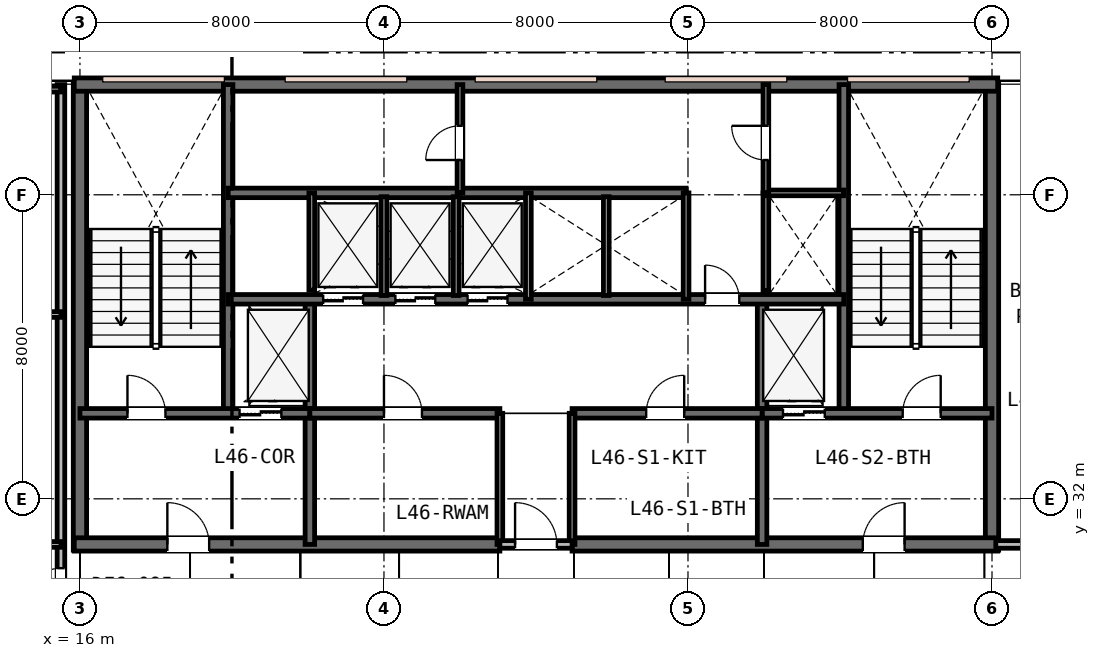
"""IFC4 building model, lengths in metres.
Left out: names, types, materials, properties, quantities, classifications, styles, units other than length and angle.
Written with IfcOpenShell. Run it as: python <this file> out.ifc"""

import sys

from ifc_helpers import new_model, si_unit, direction, frame, frame_2d, origin, place, context, subcontext, project, spatial, rectangle, extrude, element, fill, save


model = new_model("IFC4")
c1 = context("Model", 3, precision=1e-05, world=origin(), true_north=direction((0.0, 1.0)))
c2 = subcontext(c1, "Body", "Model", "MODEL_VIEW")
j1 = project(units=[si_unit("LENGTHUNIT", "METRE"), si_unit("PLANEANGLEUNIT", "RADIAN")], contexts=[c1])
p1 = place(None, origin())
s1 = spatial("IfcSite", under=j1, at=p1, CompositionType="ELEMENT")
p2 = place(p1, origin())
s2 = spatial("IfcBuilding", under=s1, at=p2, CompositionType="ELEMENT")
p3 = place(p2, frame((0.0, 0.0, 179.4)))
s3 = spatial("IfcBuildingStorey", under=s2, at=p3, CompositionType="ELEMENT", Elevation=179.4)
for number, where, z_axis, x_axis in (
    (1, (16.0, 30.65, 0.0), (0.0, 0.0, 1.0), (0.0, 1.0, 0.0)),
    (2, (40.0, 30.65, 0.0), (0.0, 0.0, 1.0), (0.0, 1.0, 0.0)),
):
    element("IfcWall", number, at=place(p3, frame(where, z_axis=z_axis, x_axis=x_axis)), inside=s3, PredefinedType="SHEAR", context=c2, shape_type="SweptSolid", body=[
        extrude(rectangle(XDim=12.3, YDim=0.35, at=frame_2d((6.15, 0.0))), origin(), (0.0, 0.0, 1.0), 3.6),
    ])
p4 = place(p3, frame((15.85, 42.9, 0.0), z_axis=(0.0, 0.0, 1.0), x_axis=(1.0, 0.0, 0.0)))
e3 = element("IfcWall", 3, at=p4, inside=s3, PredefinedType="SHEAR", context=c2, shape_type="SweptSolid", body=[
    extrude(rectangle(XDim=24.3, YDim=0.35, at=frame_2d((12.15, 0.0))), origin(), (0.0, 0.0, 1.0), 3.6),
])
p5 = place(p3, frame((15.85, 30.8, 0.0), z_axis=(0.0, 0.0, 1.0), x_axis=(1.0, 0.0, 0.0)))
e4 = element("IfcWall", 4, at=p5, inside=s3, PredefinedType="SHEAR", context=c2, shape_type="SweptSolid", body=[
    extrude(rectangle(XDim=11.2, YDim=0.35, at=frame_2d((5.6, 0.0))), origin(), (0.0, 0.0, 1.0), 3.6),
])
p6 = place(p5, frame((2.45, 0.0, 0.0)))
e5 = element("IfcOpeningElement", 5, at=p6, cuts=e4, PredefinedType="OPENING", context=c2, shape_type="SweptSolid", body=[
    extrude(rectangle(XDim=1.1, YDim=2.15, at=frame_2d((0.55, 1.075))), frame((0.0, 0.185, 0.0), z_axis=(0.0, -1.0, 0.0), x_axis=(1.0, 0.0, 0.0)), (0.0, 0.0, 1.0), 0.37),
])
p7 = place(p3, frame((28.95, 30.8, 0.0), z_axis=(0.0, 0.0, 1.0), x_axis=(1.0, 0.0, 0.0)))
e6 = element("IfcWall", 6, at=p7, inside=s3, PredefinedType="SHEAR", context=c2, shape_type="SweptSolid", body=[
    extrude(rectangle(XDim=11.2, YDim=0.35, at=frame_2d((5.6, 0.0))), origin(), (0.0, 0.0, 1.0), 3.6),
])
p8 = place(p7, frame((7.65, 0.0, 0.0)))
e7 = element("IfcOpeningElement", 7, at=p8, cuts=e6, PredefinedType="OPENING", context=c2, shape_type="SweptSolid", body=[
    extrude(rectangle(XDim=1.1, YDim=2.15, at=frame_2d((0.55, 1.075))), frame((0.0, 0.185, 0.0), z_axis=(0.0, -1.0, 0.0), x_axis=(1.0, 0.0, 0.0)), (0.0, 0.0, 1.0), 0.37),
])
for number, where, z_axis, x_axis in (
    (8, (19.9, 34.25, 0.0), (0.0, 0.0, 1.0), (0.0, 1.0, 0.0)),
    (9, (36.1, 34.25, 0.0), (0.0, 0.0, 1.0), (0.0, 1.0, 0.0)),
):
    element("IfcWall", number, at=place(p3, frame(where, z_axis=z_axis, x_axis=x_axis)), inside=s3, PredefinedType="SHEAR", context=c2, shape_type="SweptSolid", body=[
        extrude(rectangle(XDim=8.65, YDim=0.25, at=frame_2d((4.325, 0.0))), origin(), (0.0, 0.0, 1.0), 3.6),
    ])
for number, where, z_axis, x_axis in (
    (10, (22.05, 30.8, 0.0), (0.0, 0.0, 1.0), (0.0, 1.0, 0.0)),
    (11, (33.95, 30.8, 0.0), (0.0, 0.0, 1.0), (0.0, 1.0, 0.0)),
):
    element("IfcWall", number, at=place(p3, frame(where, z_axis=z_axis, x_axis=x_axis)), inside=s3, PredefinedType="SHEAR", context=c2, shape_type="SweptSolid", body=[
        extrude(rectangle(XDim=6.45, YDim=0.25, at=frame_2d((3.225, 0.0))), origin(), (0.0, 0.0, 1.0), 3.6),
    ])
p9 = place(p3, frame((16.0, 34.25, 0.0), z_axis=(0.0, 0.0, 1.0), x_axis=(1.0, 0.0, 0.0)))
e12 = element("IfcWall", 12, at=p9, inside=s3, PredefinedType="SHEAR", context=c2, shape_type="SweptSolid", body=[
    extrude(rectangle(XDim=6.05, YDim=0.25, at=frame_2d((3.025, 0.0))), origin(), (0.0, 0.0, 1.0), 3.6),
])
p10 = place(p9, frame((1.25, 0.0, 0.0)))
e13 = element("IfcOpeningElement", 13, at=p10, cuts=e12, PredefinedType="OPENING", context=c2, shape_type="SweptSolid", body=[
    extrude(rectangle(XDim=1.0, YDim=2.15, at=frame_2d((0.5, 1.075))), frame((0.0, 0.135, 0.0), z_axis=(0.0, -1.0, 0.0), x_axis=(1.0, 0.0, 0.0)), (0.0, 0.0, 1.0), 0.27),
])
p11 = place(p9, frame((4.2, 0.0, 0.0)))
e14 = element("IfcOpeningElement", 14, at=p11, cuts=e12, PredefinedType="OPENING", context=c2, shape_type="SweptSolid", body=[
    extrude(rectangle(XDim=1.1, YDim=2.15, at=frame_2d((0.55, 1.075))), frame((0.0, 0.135, 0.0), z_axis=(0.0, -1.0, 0.0), x_axis=(1.0, 0.0, 0.0)), (0.0, 0.0, 1.0), 0.27),
])
p12 = place(p3, frame((33.95, 34.25, 0.0), z_axis=(0.0, 0.0, 1.0), x_axis=(1.0, 0.0, 0.0)))
e15 = element("IfcWall", 15, at=p12, inside=s3, PredefinedType="SHEAR", context=c2, shape_type="SweptSolid", body=[
    extrude(rectangle(XDim=6.05, YDim=0.25, at=frame_2d((3.025, 0.0))), origin(), (0.0, 0.0, 1.0), 3.6),
])
p13 = place(p12, frame((3.7, 0.0, 0.0)))
e16 = element("IfcOpeningElement", 16, at=p13, cuts=e15, PredefinedType="OPENING", context=c2, shape_type="SweptSolid", body=[
    extrude(rectangle(XDim=1.0, YDim=2.15, at=frame_2d((0.5, 1.075))), frame((0.0, 0.135, 0.0), z_axis=(0.0, -1.0, 0.0), x_axis=(1.0, 0.0, 0.0)), (0.0, 0.0, 1.0), 0.27),
])
p14 = place(p12, frame((0.55, 0.0, 0.0)))
e17 = element("IfcOpeningElement", 17, at=p14, cuts=e15, PredefinedType="OPENING", context=c2, shape_type="SweptSolid", body=[
    extrude(rectangle(XDim=1.1, YDim=2.15, at=frame_2d((0.55, 1.075))), frame((0.0, 0.135, 0.0), z_axis=(0.0, -1.0, 0.0), x_axis=(1.0, 0.0, 0.0)), (0.0, 0.0, 1.0), 0.27),
])
p15 = place(p3, frame((22.05, 34.25, 0.0), z_axis=(0.0, 0.0, 1.0), x_axis=(1.0, 0.0, 0.0)))
e18 = element("IfcWall", 18, at=p15, inside=s3, PredefinedType="SHEAR", context=c2, shape_type="SweptSolid", body=[
    extrude(rectangle(XDim=5.0, YDim=0.25, at=frame_2d((2.5, 0.0))), origin(), (0.0, 0.0, 1.0), 3.6),
])
p16 = place(p15, frame((1.95, 0.0, 0.0)))
e19 = element("IfcOpeningElement", 19, at=p16, cuts=e18, PredefinedType="OPENING", context=c2, shape_type="SweptSolid", body=[
    extrude(rectangle(XDim=1.0, YDim=2.15, at=frame_2d((0.5, 1.075))), frame((0.0, 0.135, 0.0), z_axis=(0.0, -1.0, 0.0), x_axis=(1.0, 0.0, 0.0)), (0.0, 0.0, 1.0), 0.27),
])
p17 = place(p3, frame((28.95, 34.25, 0.0), z_axis=(0.0, 0.0, 1.0), x_axis=(1.0, 0.0, 0.0)))
e20 = element("IfcWall", 20, at=p17, inside=s3, PredefinedType="SHEAR", context=c2, shape_type="SweptSolid", body=[
    extrude(rectangle(XDim=5.0, YDim=0.25, at=frame_2d((2.5, 0.0))), origin(), (0.0, 0.0, 1.0), 3.6),
])
p18 = place(p17, frame((1.95, 0.0, 0.0)))
e21 = element("IfcOpeningElement", 21, at=p18, cuts=e20, PredefinedType="OPENING", context=c2, shape_type="SweptSolid", body=[
    extrude(rectangle(XDim=1.0, YDim=2.15, at=frame_2d((0.5, 1.075))), frame((0.0, 0.135, 0.0), z_axis=(0.0, -1.0, 0.0), x_axis=(1.0, 0.0, 0.0)), (0.0, 0.0, 1.0), 0.27),
])
p19 = place(p3, frame((19.9, 37.25, 0.0), z_axis=(0.0, 0.0, 1.0), x_axis=(1.0, 0.0, 0.0)))
e22 = element("IfcWall", 22, at=p19, inside=s3, PredefinedType="SHEAR", context=c2, shape_type="SweptSolid", body=[
    extrude(rectangle(XDim=16.2, YDim=0.25, at=frame_2d((8.1, 0.0))), origin(), (0.0, 0.0, 1.0), 3.6),
])
p20 = place(p19, frame((12.55, 0.0, 0.0)))
e23 = element("IfcOpeningElement", 23, at=p20, cuts=e22, PredefinedType="OPENING", context=c2, shape_type="SweptSolid", body=[
    extrude(rectangle(XDim=0.9, YDim=2.15, at=frame_2d((0.45, 1.075))), frame((0.0, 0.135, 0.0), z_axis=(0.0, -1.0, 0.0), x_axis=(1.0, 0.0, 0.0)), (0.0, 0.0, 1.0), 0.27),
])
p21 = place(p19, frame((2.5, 0.0, 0.0)))
e24 = element("IfcOpeningElement", 24, at=p21, cuts=e22, PredefinedType="OPENING", context=c2, shape_type="SweptSolid", body=[
    extrude(rectangle(XDim=1.05, YDim=2.15, at=frame_2d((0.525, 1.075))), frame((0.0, 0.135, 0.0), z_axis=(0.0, -1.0, 0.0), x_axis=(1.0, 0.0, 0.0)), (0.0, 0.0, 1.0), 0.27),
])
p22 = place(p19, frame((4.4, 0.0, 0.0)))
e25 = element("IfcOpeningElement", 25, at=p22, cuts=e22, PredefinedType="OPENING", context=c2, shape_type="SweptSolid", body=[
    extrude(rectangle(XDim=1.05, YDim=2.15, at=frame_2d((0.525, 1.075))), frame((0.0, 0.135, 0.0), z_axis=(0.0, -1.0, 0.0), x_axis=(1.0, 0.0, 0.0)), (0.0, 0.0, 1.0), 0.27),
])
p23 = place(p19, frame((6.3, 0.0, 0.0)))
e26 = element("IfcOpeningElement", 26, at=p23, cuts=e22, PredefinedType="OPENING", context=c2, shape_type="SweptSolid", body=[
    extrude(rectangle(XDim=1.05, YDim=2.15, at=frame_2d((0.525, 1.075))), frame((0.0, 0.135, 0.0), z_axis=(0.0, -1.0, 0.0), x_axis=(1.0, 0.0, 0.0)), (0.0, 0.0, 1.0), 0.27),
])
p24 = place(p3, frame((19.9, 40.05, 0.0), z_axis=(0.0, 0.0, 1.0), x_axis=(1.0, 0.0, 0.0)))
e27 = element("IfcWall", 27, at=p24, inside=s3, PredefinedType="SHEAR", context=c2, shape_type="SweptSolid", body=[
    extrude(rectangle(XDim=12.05, YDim=0.25, at=frame_2d((6.025, 0.0))), origin(), (0.0, 0.0, 1.0), 3.6),
])
for number, where, z_axis, x_axis in (
    (28, (27.05, 30.8, 0.0), (0.0, 0.0, 1.0), (0.0, 1.0, 0.0)),
    (29, (28.95, 30.8, 0.0), (0.0, 0.0, 1.0), (0.0, 1.0, 0.0)),
):
    element("IfcWall", number, at=place(p3, frame(where, z_axis=z_axis, x_axis=x_axis)), inside=s3, PredefinedType="PLUMBINGWALL", context=c2, shape_type="SweptSolid", body=[
        extrude(rectangle(XDim=3.45, YDim=0.15, at=frame_2d((1.725, 0.0))), origin(), (0.0, 0.0, 1.0), 3.07),
    ])
p25 = place(p3, frame((27.05, 30.8, 0.0), z_axis=(0.0, 0.0, 1.0), x_axis=(1.0, 0.0, 0.0)))
e30 = element("IfcWall", 30, at=p25, inside=s3, PredefinedType="PARTITIONING", context=c2, shape_type="SweptSolid", body=[
    extrude(rectangle(XDim=1.9, YDim=0.2, at=frame_2d((0.95, 0.0))), origin(), (0.0, 0.0, 1.0), 3.07),
])
p26 = place(p25, frame((0.4, 0.0, 0.0)))
e31 = element("IfcOpeningElement", 31, at=p26, cuts=e30, PredefinedType="OPENING", context=c2, shape_type="SweptSolid", body=[
    extrude(rectangle(XDim=1.1, YDim=2.15, at=frame_2d((0.55, 1.075))), frame((0.0, 0.11, 0.0), z_axis=(0.0, -1.0, 0.0), x_axis=(1.0, 0.0, 0.0)), (0.0, 0.0, 1.0), 0.22),
])
p27 = place(p3, frame((22.1, 37.49, 0.0), z_axis=(0.0, 0.0, 1.0), x_axis=(0.0, 1.0, 0.0)))
e32 = element("IfcWall", 32, at=p27, inside=s3, PredefinedType="PLUMBINGWALL", context=c2, shape_type="SweptSolid", body=[
    extrude(rectangle(XDim=2.56, YDim=0.15, at=frame_2d((1.28, 0.0))), origin(), (0.0, 0.0, 1.0), 3.33),
])
p28 = place(p3, frame((27.8, 37.25, 0.0), z_axis=(0.0, 0.0, 1.0), x_axis=(0.0, 1.0, 0.0)))
e33 = element("IfcWall", 33, at=p28, inside=s3, PredefinedType="PLUMBINGWALL", context=c2, shape_type="SweptSolid", body=[
    extrude(rectangle(XDim=2.8, YDim=0.15, at=frame_2d((1.4, 0.0))), origin(), (0.0, 0.0, 1.0), 3.33),
])
for number, where, z_axis, x_axis in (
    (34, (24.0, 37.35, 0.0), (0.0, 0.0, 1.0), (0.0, 1.0, 0.0)),
    (35, (25.9, 37.35, 0.0), (0.0, 0.0, 1.0), (0.0, 1.0, 0.0)),
):
    element("IfcWall", number, at=place(p3, frame(where, z_axis=z_axis, x_axis=x_axis)), inside=s3, PredefinedType="PLUMBINGWALL", context=c2, shape_type="SweptSolid", body=[
        extrude(rectangle(XDim=2.6, YDim=0.15, at=frame_2d((1.3, 0.0))), origin(), (0.0, 0.0, 1.0), 3.33),
    ])
p29 = place(p3, frame((31.95, 37.25, 0.0), z_axis=(0.0, 0.0, 1.0), x_axis=(0.0, 1.0, 0.0)))
e36 = element("IfcWall", 36, at=p29, inside=s3, PredefinedType="PLUMBINGWALL", context=c2, shape_type="SweptSolid", body=[
    extrude(rectangle(XDim=2.8, YDim=0.15, at=frame_2d((1.4, 0.0))), origin(), (0.0, 0.0, 1.0), 3.33),
])
p30 = place(p3, frame((29.85, 37.35, 0.0), z_axis=(0.0, 0.0, 1.0), x_axis=(0.0, 1.0, 0.0)))
e37 = element("IfcWall", 37, at=p30, inside=s3, PredefinedType="PLUMBINGWALL", context=c2, shape_type="SweptSolid", body=[
    extrude(rectangle(XDim=2.6, YDim=0.15, at=frame_2d((1.3, 0.0))), origin(), (0.0, 0.0, 1.0), 3.33),
])
p31 = place(p3, frame((34.05, 37.473, 0.0), z_axis=(0.0, 0.0, 1.0), x_axis=(0.0, 1.0, 0.0)))
e38 = element("IfcWall", 38, at=p31, inside=s3, PredefinedType="PLUMBINGWALL", context=c2, shape_type="SweptSolid", body=[
    extrude(rectangle(XDim=2.577, YDim=0.15, at=frame_2d((1.288, 0.0))), origin(), (0.0, 0.0, 1.0), 3.33),
])
p32 = place(p3, frame((34.05, 40.05, 0.0), z_axis=(0.0, 0.0, 1.0), x_axis=(1.0, 0.0, 0.0)))
e39 = element("IfcWall", 39, at=p32, inside=s3, PredefinedType="PARTITIONING", context=c2, shape_type="SweptSolid", body=[
    extrude(rectangle(XDim=2.05, YDim=0.15, at=frame_2d((1.025, 0.0))), origin(), (0.0, 0.0, 1.0), 3.33),
])
p33 = place(p3, frame((34.05, 40.05, 0.0), z_axis=(0.0, 0.0, 1.0), x_axis=(0.0, 1.0, 0.0)))
e40 = element("IfcWall", 40, at=p33, inside=s3, PredefinedType="PARTITIONING", context=c2, shape_type="SweptSolid", body=[
    extrude(rectangle(XDim=2.85, YDim=0.15, at=frame_2d((1.425, 0.0))), origin(), (0.0, 0.0, 1.0), 3.33),
])
p34 = place(p33, frame((0.865, 0.0, 0.0)))
e41 = element("IfcOpeningElement", 41, at=p34, cuts=e40, PredefinedType="OPENING", context=c2, shape_type="SweptSolid", body=[
    extrude(rectangle(XDim=0.9, YDim=2.15, at=frame_2d((0.45, 1.075))), frame((0.0, 0.085, 0.0), z_axis=(0.0, -1.0, 0.0), x_axis=(1.0, 0.0, 0.0)), (0.0, 0.0, 1.0), 0.17),
])
p35 = place(p3, frame((26.0, 40.05, 0.0), z_axis=(0.0, 0.0, 1.0), x_axis=(0.0, 1.0, 0.0)))
e42 = element("IfcWall", 42, at=p35, inside=s3, PredefinedType="PARTITIONING", context=c2, shape_type="SweptSolid", body=[
    extrude(rectangle(XDim=2.85, YDim=0.15, at=frame_2d((1.425, 0.0))), origin(), (0.0, 0.0, 1.0), 3.33),
])
p36 = place(p35, frame((0.865, 0.0, 0.0)))
e43 = element("IfcOpeningElement", 43, at=p36, cuts=e42, PredefinedType="OPENING", context=c2, shape_type="SweptSolid", body=[
    extrude(rectangle(XDim=0.9, YDim=2.15, at=frame_2d((0.45, 1.075))), frame((0.0, 0.085, 0.0), z_axis=(0.0, -1.0, 0.0), x_axis=(1.0, 0.0, 0.0)), (0.0, 0.0, 1.0), 0.17),
])
p37 = place(p3, frame((15.5, 28.6, 0.0), z_axis=(0.0, 0.0, 1.0), x_axis=(0.0, 1.0, 0.0)))
e44 = element("IfcWall", 44, at=p37, inside=s3, PredefinedType="PARTITIONING", context=c2, shape_type="SweptSolid", body=[
    extrude(rectangle(XDim=14.3, YDim=0.2, at=frame_2d((7.15, 0.0))), origin(), (0.0, 0.0, 1.0), 2.92),
])
p38 = place(p37, frame((0.625, 0.0, 0.0)))
e45 = element("IfcOpeningElement", 45, at=p38, cuts=e44, PredefinedType="OPENING", context=c2, shape_type="SweptSolid", body=[
    extrude(rectangle(XDim=0.95, YDim=2.15, at=frame_2d((0.475, 1.075))), frame((0.0, 0.11, 0.0), z_axis=(0.0, -1.0, 0.0), x_axis=(1.0, 0.0, 0.0)), (0.0, 0.0, 1.0), 0.22),
])
p39 = place(p3, frame((12.9, 30.8, 0.0), z_axis=(0.0, 0.0, 1.0), x_axis=(1.0, 0.0, 0.0)))
e46 = element("IfcWall", 46, at=p39, inside=s3, PredefinedType="PARTITIONING", context=c2, shape_type="SweptSolid", body=[
    extrude(rectangle(XDim=2.6, YDim=0.15, at=frame_2d((1.3, 0.0))), origin(), (0.0, 0.0, 1.0), 2.92),
])
for number, where, z_axis, x_axis in (
    (47, (12.9, 36.85, 0.0), (0.0, 0.0, 1.0), (1.0, 0.0, 0.0)),
    (48, (12.9, 42.78, 0.0), (0.0, 0.0, 1.0), (1.0, 0.0, 0.0)),
):
    element("IfcWall", number, at=place(p3, frame(where, z_axis=z_axis, x_axis=x_axis)), inside=s3, PredefinedType="PARTITIONING", context=c2, shape_type="SweptSolid", body=[
        extrude(rectangle(XDim=2.6, YDim=0.15, at=frame_2d((1.3, 0.0))), origin(), (0.0, 0.0, 1.0), 3.33),
    ])
p40 = place(p3, frame((40.1, 30.8, 0.0), z_axis=(0.0, 0.0, 1.0), x_axis=(1.0, 0.0, 0.0)))
e49 = element("IfcWall", 49, at=p40, inside=s3, PredefinedType="PARTITIONING", context=c2, shape_type="SweptSolid", body=[
    extrude(rectangle(XDim=4.1, YDim=0.2, at=frame_2d((2.05, 0.0))), origin(), (0.0, 0.0, 1.0), 2.92),
])
p41 = place(p40, frame((1.575, 0.0, 0.0)))
e50 = element("IfcOpeningElement", 50, at=p41, cuts=e49, PredefinedType="OPENING", context=c2, shape_type="SweptSolid", body=[
    extrude(rectangle(XDim=0.95, YDim=2.15, at=frame_2d((0.475, 1.075))), frame((0.0, 0.11, 0.0), z_axis=(0.0, -1.0, 0.0), x_axis=(1.0, 0.0, 0.0)), (0.0, 0.0, 1.0), 0.22),
])
p42 = place(p26, origin())
e51 = element("IfcDoor", 51, at=p42, inside=s3, OperationType="SINGLE_SWING_LEFT", PredefinedType="DOOR", context=c2, shape_type="SweptSolid", body=[
    extrude(rectangle(XDim=1.1, YDim=2.15, at=frame_2d((0.55, 1.075))), frame((0.0, 0.025, 0.0), z_axis=(0.0, -1.0, 0.0), x_axis=(1.0, 0.0, 0.0)), (0.0, 0.0, 1.0), 0.05),
])
fill(e31, e51)
p43 = place(p10, origin())
e52 = element("IfcDoor", 52, at=p43, inside=s3, OperationType="SINGLE_SWING_LEFT", PredefinedType="DOOR", context=c2, shape_type="SweptSolid", body=[
    extrude(rectangle(XDim=1.0, YDim=2.15, at=frame_2d((0.5, 1.075))), frame((0.0, 0.025, 0.0), z_axis=(0.0, -1.0, 0.0), x_axis=(1.0, 0.0, 0.0)), (0.0, 0.0, 1.0), 0.05),
])
fill(e13, e52)
p44 = place(p13, origin())
e53 = element("IfcDoor", 53, at=p44, inside=s3, OperationType="SINGLE_SWING_RIGHT", PredefinedType="DOOR", context=c2, shape_type="SweptSolid", body=[
    extrude(rectangle(XDim=1.0, YDim=2.15, at=frame_2d((0.5, 1.075))), frame((0.0, 0.025, 0.0), z_axis=(0.0, -1.0, 0.0), x_axis=(1.0, 0.0, 0.0)), (0.0, 0.0, 1.0), 0.05),
])
fill(e16, e53)
p45 = place(p6, origin())
e54 = element("IfcDoor", 54, at=p45, inside=s3, OperationType="SINGLE_SWING_LEFT", PredefinedType="DOOR", context=c2, shape_type="SweptSolid", body=[
    extrude(rectangle(XDim=1.1, YDim=2.15, at=frame_2d((0.55, 1.075))), frame((0.0, 0.025, 0.0), z_axis=(0.0, -1.0, 0.0), x_axis=(1.0, 0.0, 0.0)), (0.0, 0.0, 1.0), 0.05),
])
fill(e5, e54)
p46 = place(p8, origin())
e55 = element("IfcDoor", 55, at=p46, inside=s3, OperationType="SINGLE_SWING_RIGHT", PredefinedType="DOOR", context=c2, shape_type="SweptSolid", body=[
    extrude(rectangle(XDim=1.1, YDim=2.15, at=frame_2d((0.55, 1.075))), frame((0.0, 0.025, 0.0), z_axis=(0.0, -1.0, 0.0), x_axis=(1.0, 0.0, 0.0)), (0.0, 0.0, 1.0), 0.05),
])
fill(e7, e55)
p47 = place(p16, origin())
e56 = element("IfcDoor", 56, at=p47, inside=s3, OperationType="SINGLE_SWING_LEFT", PredefinedType="DOOR", context=c2, shape_type="SweptSolid", body=[
    extrude(rectangle(XDim=1.0, YDim=2.15, at=frame_2d((0.5, 1.075))), frame((0.0, 0.025, 0.0), z_axis=(0.0, -1.0, 0.0), x_axis=(1.0, 0.0, 0.0)), (0.0, 0.0, 1.0), 0.05),
])
fill(e19, e56)
p48 = place(p18, origin())
e57 = element("IfcDoor", 57, at=p48, inside=s3, OperationType="SINGLE_SWING_RIGHT", PredefinedType="DOOR", context=c2, shape_type="SweptSolid", body=[
    extrude(rectangle(XDim=1.0, YDim=2.15, at=frame_2d((0.5, 1.075))), frame((0.0, 0.025, 0.0), z_axis=(0.0, -1.0, 0.0), x_axis=(1.0, 0.0, 0.0)), (0.0, 0.0, 1.0), 0.05),
])
fill(e21, e57)
p49 = place(p20, origin())
e58 = element("IfcDoor", 58, at=p49, inside=s3, OperationType="SINGLE_SWING_LEFT", PredefinedType="DOOR", context=c2, shape_type="SweptSolid", body=[
    extrude(rectangle(XDim=0.9, YDim=2.15, at=frame_2d((0.45, 1.075))), frame((0.0, 0.025, 0.0), z_axis=(0.0, -1.0, 0.0), x_axis=(1.0, 0.0, 0.0)), (0.0, 0.0, 1.0), 0.05),
])
fill(e23, e58)
p50 = place(p34, origin())
e59 = element("IfcDoor", 59, at=p50, inside=s3, OperationType="SINGLE_SWING_RIGHT", PredefinedType="DOOR", context=c2, shape_type="SweptSolid", body=[
    extrude(rectangle(XDim=0.9, YDim=2.15, at=frame_2d((0.45, 1.075))), frame((0.0, 0.025, 0.0), z_axis=(0.0, -1.0, 0.0), x_axis=(1.0, 0.0, 0.0)), (0.0, 0.0, 1.0), 0.05),
])
fill(e41, e59)
p51 = place(p36, origin())
e60 = element("IfcDoor", 60, at=p51, inside=s3, OperationType="SINGLE_SWING_LEFT", PredefinedType="DOOR", context=c2, shape_type="SweptSolid", body=[
    extrude(rectangle(XDim=0.9, YDim=2.15, at=frame_2d((0.45, 1.075))), frame((0.0, 0.025, 0.0), z_axis=(0.0, -1.0, 0.0), x_axis=(1.0, 0.0, 0.0)), (0.0, 0.0, 1.0), 0.05),
])
fill(e43, e60)
p52 = place(p38, origin())
e61 = element("IfcDoor", 61, at=p52, inside=s3, OperationType="SINGLE_SWING_LEFT", PredefinedType="DOOR", context=c2, shape_type="SweptSolid", body=[
    extrude(rectangle(XDim=0.95, YDim=2.15, at=frame_2d((0.475, 1.075))), frame((0.0, 0.025, 0.0), z_axis=(0.0, -1.0, 0.0), x_axis=(1.0, 0.0, 0.0)), (0.0, 0.0, 1.0), 0.05),
])
fill(e45, e61)
p53 = place(p11, origin())
e62 = element("IfcDoor", 62, at=p53, inside=s3, OperationType="DOUBLE_DOOR_SLIDING", PredefinedType="DOOR", context=c2, shape_type="SweptSolid", body=[
    extrude(rectangle(XDim=1.1, YDim=2.15, at=frame_2d((0.55, 1.075))), frame((0.0, 0.025, 0.0), z_axis=(0.0, -1.0, 0.0), x_axis=(1.0, 0.0, 0.0)), (0.0, 0.0, 1.0), 0.05),
])
fill(e14, e62)
p54 = place(p14, origin())
e63 = element("IfcDoor", 63, at=p54, inside=s3, OperationType="DOUBLE_DOOR_SLIDING", PredefinedType="DOOR", context=c2, shape_type="SweptSolid", body=[
    extrude(rectangle(XDim=1.1, YDim=2.15, at=frame_2d((0.55, 1.075))), frame((0.0, 0.025, 0.0), z_axis=(0.0, -1.0, 0.0), x_axis=(1.0, 0.0, 0.0)), (0.0, 0.0, 1.0), 0.05),
])
fill(e17, e63)
p55 = place(p21, origin())
e64 = element("IfcDoor", 64, at=p55, inside=s3, OperationType="DOUBLE_DOOR_SLIDING", PredefinedType="DOOR", context=c2, shape_type="SweptSolid", body=[
    extrude(rectangle(XDim=1.05, YDim=2.15, at=frame_2d((0.525, 1.075))), frame((0.0, 0.025, 0.0), z_axis=(0.0, -1.0, 0.0), x_axis=(1.0, 0.0, 0.0)), (0.0, 0.0, 1.0), 0.05),
])
fill(e24, e64)
p56 = place(p22, origin())
e65 = element("IfcDoor", 65, at=p56, inside=s3, OperationType="DOUBLE_DOOR_SLIDING", PredefinedType="DOOR", context=c2, shape_type="SweptSolid", body=[
    extrude(rectangle(XDim=1.05, YDim=2.15, at=frame_2d((0.525, 1.075))), frame((0.0, 0.025, 0.0), z_axis=(0.0, -1.0, 0.0), x_axis=(1.0, 0.0, 0.0)), (0.0, 0.0, 1.0), 0.05),
])
fill(e25, e65)
p57 = place(p23, origin())
e66 = element("IfcDoor", 66, at=p57, inside=s3, OperationType="DOUBLE_DOOR_SLIDING", PredefinedType="DOOR", context=c2, shape_type="SweptSolid", body=[
    extrude(rectangle(XDim=1.05, YDim=2.15, at=frame_2d((0.525, 1.075))), frame((0.0, 0.025, 0.0), z_axis=(0.0, -1.0, 0.0), x_axis=(1.0, 0.0, 0.0)), (0.0, 0.0, 1.0), 0.05),
])
fill(e26, e66)
save(model, sys.argv[1])
